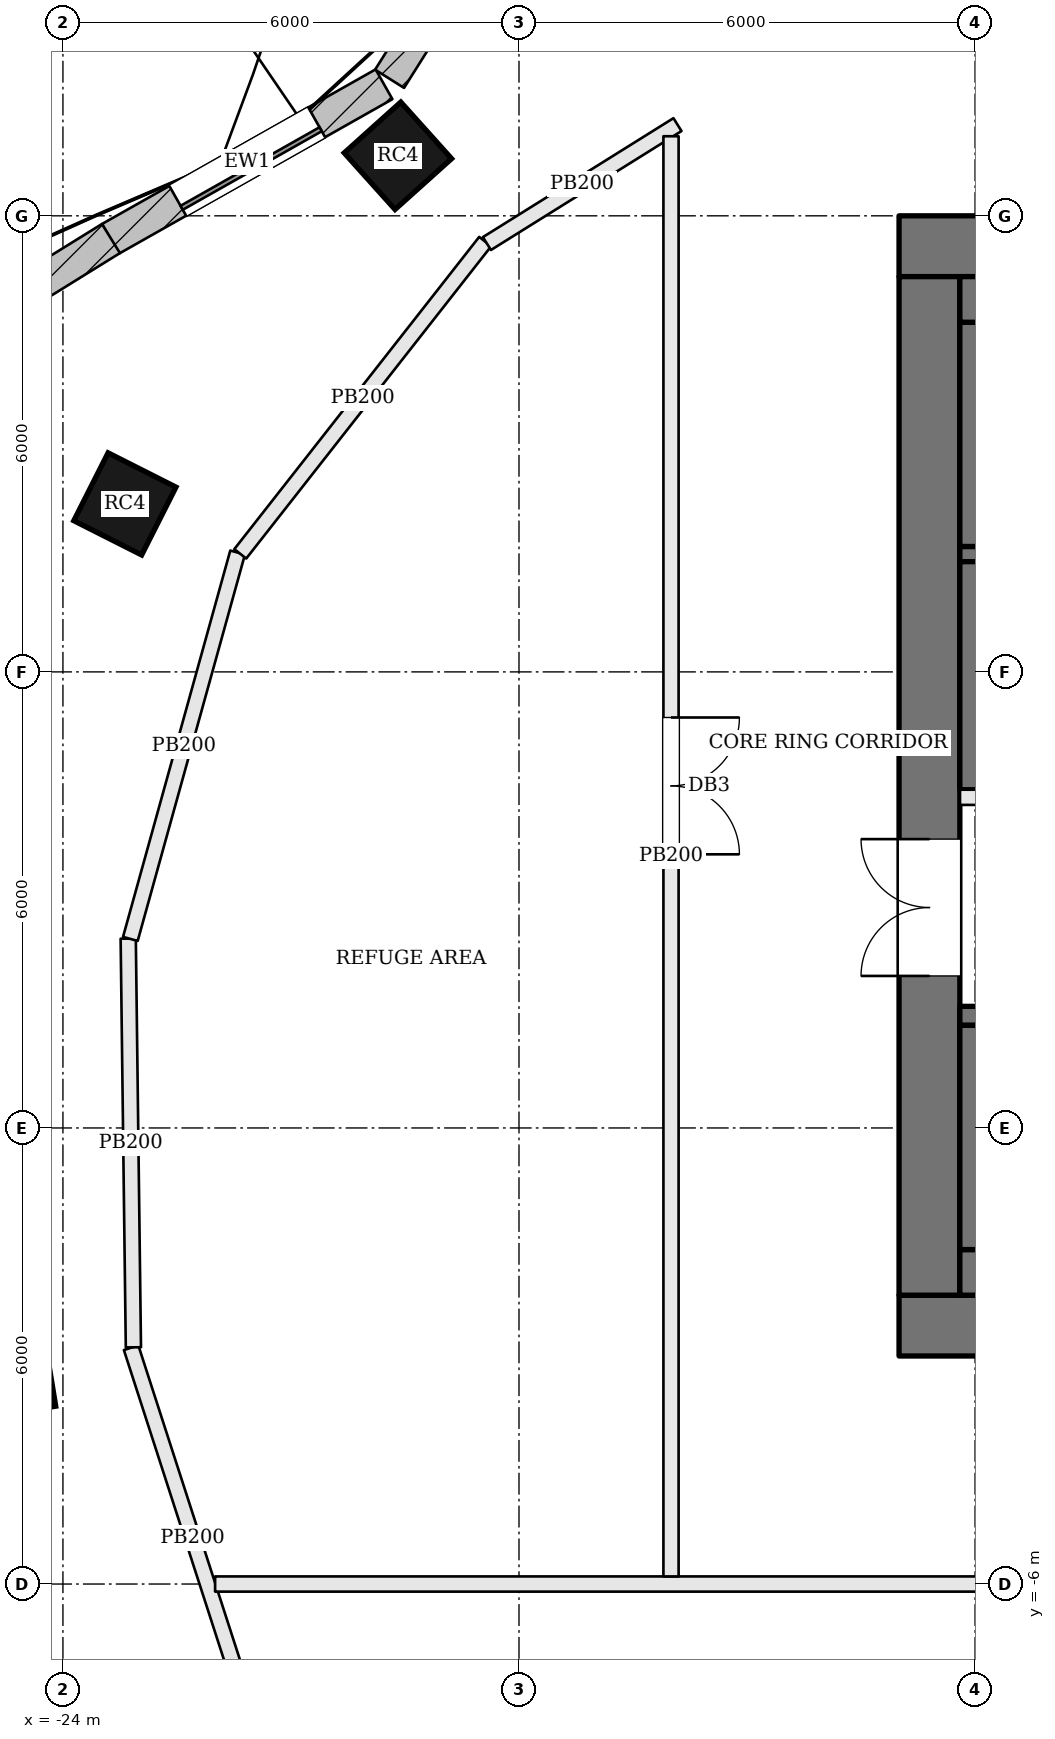
"""IFC4 building model, lengths in metres.
Left out: names, types, materials, properties, quantities, classifications, styles, units other than length and angle.
Written with IfcOpenShell. Run it as: python <this file> out.ifc"""

import sys

from ifc_helpers import new_model, si_unit, direction, frame, frame_2d, origin, origin_2d, place, context, subcontext, project, spatial, rectangle, extrude, element, fill, save


model = new_model("IFC4")
c1 = context("Model", 3, precision=1e-05, world=origin(), true_north=direction((0.0, 1.0)))
c2 = subcontext(c1, "Body", "Model", "MODEL_VIEW")
j1 = project(units=[si_unit("LENGTHUNIT", "METRE"), si_unit("PLANEANGLEUNIT", "RADIAN")], contexts=[c1])
p1 = place(None, origin())
s1 = spatial("IfcSite", under=j1, at=p1, CompositionType="ELEMENT")
p2 = place(p1, origin())
s2 = spatial("IfcBuilding", under=s1, at=p2, CompositionType="ELEMENT")
p3 = place(p2, frame((0.0, 0.0, 193.5)))
s3 = spatial("IfcBuildingStorey", under=s2, at=p3, CompositionType="ELEMENT", Elevation=193.5)
p4 = place(p3, frame((-13.0, 11.6, 0.0), z_axis=(0.0, 0.0, 1.0), x_axis=(1.0, 0.0, 0.0)))
e1 = element("IfcWall", 1, at=p4, inside=s3, PredefinedType="SHEAR", context=c2, shape_type="SweptSolid", body=[
    extrude(rectangle(XDim=26.0, YDim=0.8, at=frame_2d((13.0, 0.0))), origin(), (0.0, 0.0, 1.0), 3.9),
])
p5 = place(p4, frame((8.575, 0.0, 0.0)))
e2 = element("IfcOpeningElement", 2, at=p5, cuts=e1, PredefinedType="OPENING", context=c2, shape_type="SweptSolid", body=[
    extrude(rectangle(XDim=0.7, YDim=2.1, at=frame_2d((0.35, 1.05))), frame((0.0, 0.41, 0.0), z_axis=(0.0, -1.0, 0.0), x_axis=(1.0, 0.0, 0.0)), (0.0, 0.0, 1.0), 0.82),
])
p6 = place(p4, frame((10.875, 0.0, 0.0)))
e3 = element("IfcOpeningElement", 3, at=p6, cuts=e1, PredefinedType="OPENING", context=c2, shape_type="SweptSolid", body=[
    extrude(rectangle(XDim=1.0, YDim=2.1, at=frame_2d((0.5, 1.05))), frame((0.0, 0.41, 0.0), z_axis=(0.0, -1.0, 0.0), x_axis=(1.0, 0.0, 0.0)), (0.0, 0.0, 1.0), 0.82),
])
p7 = place(p4, frame((13.875, 0.0, 0.0)))
e4 = element("IfcOpeningElement", 4, at=p7, cuts=e1, PredefinedType="OPENING", context=c2, shape_type="SweptSolid", body=[
    extrude(rectangle(XDim=0.7, YDim=2.1, at=frame_2d((0.35, 1.05))), frame((0.0, 0.41, 0.0), z_axis=(0.0, -1.0, 0.0), x_axis=(1.0, 0.0, 0.0)), (0.0, 0.0, 1.0), 0.82),
])
p8 = place(p4, frame((16.325, 0.0, 0.0)))
e5 = element("IfcOpeningElement", 5, at=p8, cuts=e1, PredefinedType="OPENING", context=c2, shape_type="SweptSolid", body=[
    extrude(rectangle(XDim=0.7, YDim=2.1, at=frame_2d((0.35, 1.05))), frame((0.0, 0.41, 0.0), z_axis=(0.0, -1.0, 0.0), x_axis=(1.0, 0.0, 0.0)), (0.0, 0.0, 1.0), 0.82),
])
p9 = place(p4, frame((6.88, 0.0, 0.0)))
e6 = element("IfcOpeningElement", 6, at=p9, cuts=e1, PredefinedType="OPENING", context=c2, shape_type="SweptSolid", body=[
    extrude(rectangle(XDim=1.0, YDim=2.1, at=frame_2d((0.5, 1.05))), frame((0.0, 0.41, 0.0), z_axis=(0.0, -1.0, 0.0), x_axis=(1.0, 0.0, 0.0)), (0.0, 0.0, 1.0), 0.82),
])
p10 = place(p4, frame((18.12, 0.0, 0.0)))
e7 = element("IfcOpeningElement", 7, at=p10, cuts=e1, PredefinedType="OPENING", context=c2, shape_type="SweptSolid", body=[
    extrude(rectangle(XDim=1.0, YDim=2.1, at=frame_2d((0.5, 1.05))), frame((0.0, 0.41, 0.0), z_axis=(0.0, -1.0, 0.0), x_axis=(1.0, 0.0, 0.0)), (0.0, 0.0, 1.0), 0.82),
])
p11 = place(p3, frame((-13.0, -2.6, 0.0), z_axis=(0.0, 0.0, 1.0), x_axis=(1.0, 0.0, 0.0)))
e8 = element("IfcWall", 8, at=p11, inside=s3, PredefinedType="SHEAR", context=c2, shape_type="SweptSolid", body=[
    extrude(rectangle(XDim=26.0, YDim=0.8, at=frame_2d((13.0, 0.0))), origin(), (0.0, 0.0, 1.0), 3.9),
])
p12 = place(p11, frame((8.975, 0.0, 0.0)))
e9 = element("IfcOpeningElement", 9, at=p12, cuts=e8, PredefinedType="OPENING", context=c2, shape_type="SweptSolid", body=[
    extrude(rectangle(XDim=0.7, YDim=2.1, at=frame_2d((0.35, 1.05))), frame((0.0, 0.41, 0.0), z_axis=(0.0, -1.0, 0.0), x_axis=(1.0, 0.0, 0.0)), (0.0, 0.0, 1.0), 0.82),
])
p13 = place(p11, frame((11.675, 0.0, 0.0)))
e10 = element("IfcOpeningElement", 10, at=p13, cuts=e8, PredefinedType="OPENING", context=c2, shape_type="SweptSolid", body=[
    extrude(rectangle(XDim=1.0, YDim=2.1, at=frame_2d((0.5, 1.05))), frame((0.0, 0.41, 0.0), z_axis=(0.0, -1.0, 0.0), x_axis=(1.0, 0.0, 0.0)), (0.0, 0.0, 1.0), 0.82),
])
p14 = place(p11, frame((14.275, 0.0, 0.0)))
e11 = element("IfcOpeningElement", 11, at=p14, cuts=e8, PredefinedType="OPENING", context=c2, shape_type="SweptSolid", body=[
    extrude(rectangle(XDim=0.7, YDim=2.1, at=frame_2d((0.35, 1.05))), frame((0.0, 0.41, 0.0), z_axis=(0.0, -1.0, 0.0), x_axis=(1.0, 0.0, 0.0)), (0.0, 0.0, 1.0), 0.82),
])
p15 = place(p11, frame((16.225, 0.0, 0.0)))
e12 = element("IfcOpeningElement", 12, at=p15, cuts=e8, PredefinedType="OPENING", context=c2, shape_type="SweptSolid", body=[
    extrude(rectangle(XDim=0.9, YDim=2.1, at=frame_2d((0.45, 1.05))), frame((0.0, 0.41, 0.0), z_axis=(0.0, -1.0, 0.0), x_axis=(1.0, 0.0, 0.0)), (0.0, 0.0, 1.0), 0.82),
])
p16 = place(p11, frame((6.88, 0.0, 0.0)))
e13 = element("IfcOpeningElement", 13, at=p16, cuts=e8, PredefinedType="OPENING", context=c2, shape_type="SweptSolid", body=[
    extrude(rectangle(XDim=1.0, YDim=2.1, at=frame_2d((0.5, 1.05))), frame((0.0, 0.41, 0.0), z_axis=(0.0, -1.0, 0.0), x_axis=(1.0, 0.0, 0.0)), (0.0, 0.0, 1.0), 0.82),
])
p17 = place(p11, frame((18.12, 0.0, 0.0)))
e14 = element("IfcOpeningElement", 14, at=p17, cuts=e8, PredefinedType="OPENING", context=c2, shape_type="SweptSolid", body=[
    extrude(rectangle(XDim=1.0, YDim=2.1, at=frame_2d((0.5, 1.05))), frame((0.0, 0.41, 0.0), z_axis=(0.0, -1.0, 0.0), x_axis=(1.0, 0.0, 0.0)), (0.0, 0.0, 1.0), 0.82),
])
p18 = place(p3, frame((-12.6, -2.2, 0.0), z_axis=(0.0, 0.0, 1.0), x_axis=(0.0, 1.0, 0.0)))
e15 = element("IfcWall", 15, at=p18, inside=s3, PredefinedType="SHEAR", context=c2, shape_type="SweptSolid", body=[
    extrude(rectangle(XDim=13.4, YDim=0.8, at=frame_2d((6.7, 0.0))), origin(), (0.0, 0.0, 1.0), 3.9),
])
p19 = place(p18, frame((4.2, 0.0, 0.0)))
e16 = element("IfcOpeningElement", 16, at=p19, cuts=e15, PredefinedType="OPENING", context=c2, shape_type="SweptSolid", body=[
    extrude(rectangle(XDim=1.8, YDim=2.1, at=frame_2d((0.9, 1.05))), frame((0.0, 0.41, 0.0), z_axis=(0.0, -1.0, 0.0), x_axis=(1.0, 0.0, 0.0)), (0.0, 0.0, 1.0), 0.82),
])
for number, where, z_axis, x_axis in (
    (17, (-19.593, 12.79, 0.0), (0.0, 0.0, 1.0), (-0.744, -0.668, 0.0)),
    (18, (-23.185, 8.21, 0.0), (0.0, 0.0, 1.0), (-0.451, -0.893, 0.0)),
    (19, (-24.669, -3.248, 0.0), (0.0, 0.0, 1.0), (0.162, -0.987, 0.0)),
):
    element("IfcColumn", number, at=place(p3, frame(where, z_axis=z_axis, x_axis=x_axis)), inside=s3, PredefinedType="COLUMN", context=c2, shape_type="SweptSolid", body=[
        extrude(rectangle(XDim=1.0, YDim=1.0, at=origin_2d()), origin(), (0.0, 0.0, 1.0), 3.9),
    ])
p20 = place(p3, frame((-16.998, 18.099, 0.0), z_axis=(0.0, 0.0, 1.0), x_axis=(-0.532745661304, -0.846275404559, 0.0)))
e20 = element("IfcWall", 20, at=p20, inside=s3, PredefinedType="SOLIDWALL", context=c2, shape_type="SweptSolid", body=[
    extrude(rectangle(XDim=5.076, YDim=0.45, at=frame_2d((2.538, 0.0))), origin(), (0.0, 0.0, 1.0), 3.7),
])
p21 = place(p20, frame((1.638, 0.0, 0.9)))
e21 = element("IfcOpeningElement", 21, at=p21, cuts=e20, PredefinedType="OPENING", context=c2, shape_type="SweptSolid", body=[
    extrude(rectangle(XDim=1.8, YDim=2.3, at=frame_2d((0.9, 1.15))), frame((0.0, 0.235, 0.0), z_axis=(0.0, -1.0, 0.0), x_axis=(1.0, 0.0, 0.0)), (0.0, 0.0, 1.0), 0.47),
])
p22 = place(p3, frame((-19.776, 13.731, 0.0), z_axis=(0.0, 0.0, 1.0), x_axis=(-0.870610133829, -0.491973571318, 0.0)))
e22 = element("IfcWall", 22, at=p22, inside=s3, PredefinedType="SOLIDWALL", context=c2, shape_type="SweptSolid", body=[
    extrude(rectangle(XDim=4.134, YDim=0.45, at=frame_2d((2.067, 0.0))), origin(), (0.0, 0.0, 1.0), 3.7),
])
p23 = place(p22, frame((1.017, 0.0, 0.9)))
e23 = element("IfcOpeningElement", 23, at=p23, cuts=e22, PredefinedType="OPENING", context=c2, shape_type="SweptSolid", body=[
    extrude(rectangle(XDim=2.1, YDim=2.3, at=frame_2d((1.05, 1.15))), frame((0.0, 0.235, 0.0), z_axis=(0.0, -1.0, 0.0), x_axis=(1.0, 0.0, 0.0)), (0.0, 0.0, 1.0), 0.47),
])
p24 = place(p3, frame((-23.368, 11.701, 0.0), z_axis=(0.0, 0.0, 1.0), x_axis=(-0.850251408633, -0.526376806211, 0.0)))
e24 = element("IfcWall", 24, at=p24, inside=s3, PredefinedType="SOLIDWALL", context=c2, shape_type="SweptSolid", body=[
    extrude(rectangle(XDim=5.302, YDim=0.45, at=frame_2d((2.651, 0.0))), origin(), (0.0, 0.0, 1.0), 3.7),
])
p25 = place(p24, frame((1.601, 0.0, 0.9)))
e25 = element("IfcOpeningElement", 25, at=p25, cuts=e24, PredefinedType="OPENING", context=c2, shape_type="SweptSolid", body=[
    extrude(rectangle(XDim=2.1, YDim=2.3, at=frame_2d((1.05, 1.15))), frame((0.0, 0.235, 0.0), z_axis=(0.0, -1.0, 0.0), x_axis=(1.0, 0.0, 0.0)), (0.0, 0.0, 1.0), 0.47),
])
p26 = place(p3, frame((-12.2, 1.475, 0.0), z_axis=(0.0, 0.0, 1.0), x_axis=(1.0, 0.0, 0.0)))
e26 = element("IfcWall", 26, at=p26, inside=s3, PredefinedType="SOLIDWALL", context=c2, shape_type="SweptSolid", body=[
    extrude(rectangle(XDim=7.1, YDim=0.25, at=frame_2d((3.55, 0.0))), origin(), (0.0, 0.0, 1.0), 3.7),
])
p27 = place(p26, frame((5.8, 0.0, 0.0)))
e27 = element("IfcOpeningElement", 27, at=p27, cuts=e26, PredefinedType="OPENING", context=c2, shape_type="SweptSolid", body=[
    extrude(rectangle(XDim=1.2, YDim=2.1, at=frame_2d((0.6, 1.05))), frame((0.0, 0.135, 0.0), z_axis=(0.0, -1.0, 0.0), x_axis=(1.0, 0.0, 0.0)), (0.0, 0.0, 1.0), 0.27),
])
p28 = place(p3, frame((-12.2, 4.35, 0.0), z_axis=(0.0, 0.0, 1.0), x_axis=(1.0, 0.0, 0.0)))
e28 = element("IfcWall", 28, at=p28, inside=s3, PredefinedType="SOLIDWALL", context=c2, shape_type="SweptSolid", body=[
    extrude(rectangle(XDim=7.1, YDim=0.2, at=frame_2d((3.55, 0.0))), origin(), (0.0, 0.0, 1.0), 3.7),
])
p29 = place(p28, frame((4.4, 0.0, 0.0)))
e29 = element("IfcOpeningElement", 29, at=p29, cuts=e28, PredefinedType="OPENING", context=c2, shape_type="SweptSolid", body=[
    extrude(rectangle(XDim=1.2, YDim=2.1, at=frame_2d((0.6, 1.05))), frame((0.0, 0.11, 0.0), z_axis=(0.0, -1.0, 0.0), x_axis=(1.0, 0.0, 0.0)), (0.0, 0.0, 1.0), 0.22),
])
p30 = place(p28, frame((1.1, 0.0, 0.0)))
e30 = element("IfcOpeningElement", 30, at=p30, cuts=e28, PredefinedType="OPENING", context=c2, shape_type="SweptSolid", body=[
    extrude(rectangle(XDim=1.2, YDim=2.1, at=frame_2d((0.6, 1.05))), frame((0.0, 0.11, 0.0), z_axis=(0.0, -1.0, 0.0), x_axis=(1.0, 0.0, 0.0)), (0.0, 0.0, 1.0), 0.22),
])
p31 = place(p3, frame((-12.2, 7.525, 0.0), z_axis=(0.0, 0.0, 1.0), x_axis=(1.0, 0.0, 0.0)))
e31 = element("IfcWall", 31, at=p31, inside=s3, PredefinedType="SOLIDWALL", context=c2, shape_type="SweptSolid", body=[
    extrude(rectangle(XDim=7.1, YDim=0.25, at=frame_2d((3.55, 0.0))), origin(), (0.0, 0.0, 1.0), 3.7),
])
p32 = place(p31, frame((5.8, 0.0, 0.0)))
e32 = element("IfcOpeningElement", 32, at=p32, cuts=e31, PredefinedType="OPENING", context=c2, shape_type="SweptSolid", body=[
    extrude(rectangle(XDim=1.2, YDim=2.1, at=frame_2d((0.6, 1.05))), frame((0.0, 0.135, 0.0), z_axis=(0.0, -1.0, 0.0), x_axis=(1.0, 0.0, 0.0)), (0.0, 0.0, 1.0), 0.27),
])
p33 = place(p3, frame((-12.2, -1.9, 0.0), z_axis=(0.0, 0.0, 1.0), x_axis=(1.0, 0.0, 0.0)))
e33 = element("IfcWall", 33, at=p33, inside=s3, PredefinedType="SOLIDWALL", context=c2, shape_type="SweptSolid", body=[
    extrude(rectangle(XDim=6.08, YDim=0.6, at=frame_2d((3.04, 0.0))), origin(), (0.0, 0.0, 1.0), 3.7),
])
p34 = place(p3, frame((-11.9, -1.6, 0.0), z_axis=(0.0, 0.0, 1.0), x_axis=(0.0, 1.0, 0.0)))
e34 = element("IfcWall", 34, at=p34, inside=s3, PredefinedType="SOLIDWALL", context=c2, shape_type="SweptSolid", body=[
    extrude(rectangle(XDim=2.95, YDim=0.6, at=frame_2d((1.475, 0.0))), origin(), (0.0, 0.0, 1.0), 3.7),
])
p35 = place(p3, frame((-11.9, 4.45, 0.0), z_axis=(0.0, 0.0, 1.0), x_axis=(0.0, 1.0, 0.0)))
e35 = element("IfcWall", 35, at=p35, inside=s3, PredefinedType="SOLIDWALL", context=c2, shape_type="SweptSolid", body=[
    extrude(rectangle(XDim=3.0, YDim=0.6, at=frame_2d((1.5, 0.0))), origin(), (0.0, 0.0, 1.0), 3.7),
])
p36 = place(p3, frame((-11.9, 7.65, 0.0), z_axis=(0.0, 0.0, 1.0), x_axis=(0.0, 1.0, 0.0)))
e36 = element("IfcWall", 36, at=p36, inside=s3, PredefinedType="SOLIDWALL", context=c2, shape_type="SweptSolid", body=[
    extrude(rectangle(XDim=2.95, YDim=0.6, at=frame_2d((1.475, 0.0))), origin(), (0.0, 0.0, 1.0), 3.7),
])
p37 = place(p3, frame((-12.2, 10.9, 0.0), z_axis=(0.0, 0.0, 1.0), x_axis=(1.0, 0.0, 0.0)))
e37 = element("IfcWall", 37, at=p37, inside=s3, PredefinedType="SOLIDWALL", context=c2, shape_type="SweptSolid", body=[
    extrude(rectangle(XDim=6.08, YDim=0.6, at=frame_2d((3.04, 0.0))), origin(), (0.0, 0.0, 1.0), 3.7),
])
p38 = place(p3, frame((-21.486, -7.895, 0.0), z_axis=(0.0, 0.0, 1.0), x_axis=(-0.307481575482, 0.951554034587, 0.0)))
e38 = element("IfcWall", 38, at=p38, inside=s3, PredefinedType="PARTITIONING", context=c2, shape_type="SweptSolid", body=[
    extrude(rectangle(XDim=5.259, YDim=0.2, at=frame_2d((2.629, 0.0))), origin(), (0.0, 0.0, 1.0), 3.7),
])
p39 = place(p3, frame((-21.998, -6.0, 0.0), z_axis=(0.0, 0.0, 1.0), x_axis=(1.0, 0.0, 0.0)))
e39 = element("IfcWall", 39, at=p39, inside=s3, PredefinedType="PARTITIONING", context=c2, shape_type="SweptSolid", body=[
    extrude(rectangle(XDim=44.036, YDim=0.2, at=frame_2d((22.018, 0.0))), origin(), (0.0, 0.0, 1.0), 3.7),
])
p40 = place(p39, frame((21.098, 0.0, 0.0)))
e40 = element("IfcOpeningElement", 40, at=p40, cuts=e39, PredefinedType="OPENING", context=c2, shape_type="SweptSolid", body=[
    extrude(rectangle(XDim=1.8, YDim=2.1, at=frame_2d((0.9, 1.05))), frame((0.0, 0.11, 0.0), z_axis=(0.0, -1.0, 0.0), x_axis=(1.0, 0.0, 0.0)), (0.0, 0.0, 1.0), 0.22),
])
p41 = place(p3, frame((-23.073, -2.886, 0.0), z_axis=(0.0, 0.0, 1.0), x_axis=(-0.012666982201, 0.999919770563, 0.0)))
e41 = element("IfcWall", 41, at=p41, inside=s3, PredefinedType="PARTITIONING", context=c2, shape_type="SweptSolid", body=[
    extrude(rectangle(XDim=5.377, YDim=0.2, at=frame_2d((2.689, 0.0))), origin(), (0.0, 0.0, 1.0), 3.7),
])
p42 = place(p3, frame((-23.113, 2.487, 0.0), z_axis=(0.0, 0.0, 1.0), x_axis=(0.267500643582, 0.963557681555, 0.0)))
e42 = element("IfcWall", 42, at=p42, inside=s3, PredefinedType="PARTITIONING", context=c2, shape_type="SweptSolid", body=[
    extrude(rectangle(XDim=5.275, YDim=0.2, at=frame_2d((2.638, 0.0))), origin(), (0.0, 0.0, 1.0), 3.7),
])
p43 = place(p3, frame((-21.667, 7.553, 0.0), z_axis=(0.0, 0.0, 1.0), x_axis=(0.617143909163, 0.786850300491, 0.0)))
e43 = element("IfcWall", 43, at=p43, inside=s3, PredefinedType="PARTITIONING", context=c2, shape_type="SweptSolid", body=[
    extrude(rectangle(XDim=5.221, YDim=0.2, at=frame_2d((2.61, 0.0))), origin(), (0.0, 0.0, 1.0), 3.7),
])
p44 = place(p3, frame((-18.422, 11.635, 0.0), z_axis=(0.0, 0.0, 1.0), x_axis=(0.848299824463, 0.529516201656, 0.0)))
e44 = element("IfcWall", 44, at=p44, inside=s3, PredefinedType="PARTITIONING", context=c2, shape_type="SweptSolid", body=[
    extrude(rectangle(XDim=2.955, YDim=0.2, at=frame_2d((1.478, 0.0))), origin(), (0.0, 0.0, 1.0), 3.7),
])
p45 = place(p3, frame((-16.0, 13.047, 0.0), z_axis=(0.0, 0.0, 1.0), x_axis=(0.0, -1.0, 0.0)))
e45 = element("IfcWall", 45, at=p45, inside=s3, PredefinedType="PARTITIONING", context=c2, shape_type="SweptSolid", body=[
    extrude(rectangle(XDim=18.947, YDim=0.2, at=frame_2d((9.474, 0.0))), origin(), (0.0, 0.0, 1.0), 3.7),
])
p46 = place(p45, frame((7.647, 0.0, 0.0)))
e46 = element("IfcOpeningElement", 46, at=p46, cuts=e45, PredefinedType="OPENING", context=c2, shape_type="SweptSolid", body=[
    extrude(rectangle(XDim=1.8, YDim=2.1, at=frame_2d((0.9, 1.05))), frame((0.0, 0.11, 0.0), z_axis=(0.0, -1.0, 0.0), x_axis=(1.0, 0.0, 0.0)), (0.0, 0.0, 1.0), 0.22),
])
p47 = place(p23, origin())
e47 = element("IfcWindow", 47, at=p47, inside=s3, PartitioningType="SINGLE_PANEL", PredefinedType="WINDOW", context=c2, shape_type="SweptSolid", body=[
    extrude(rectangle(XDim=2.1, YDim=2.3, at=frame_2d((1.05, 1.15))), frame((0.0, 0.135, 0.0), z_axis=(0.0, -1.0, 0.0), x_axis=(1.0, 0.0, 0.0)), (0.0, 0.0, 1.0), 0.06),
])
fill(e23, e47)
p48 = place(p19, origin())
e48 = element("IfcDoor", 48, at=p48, inside=s3, OperationType="DOUBLE_DOOR_SINGLE_SWING", PredefinedType="DOOR", context=c2, shape_type="SweptSolid", body=[
    extrude(rectangle(XDim=1.8, YDim=2.1, at=frame_2d((0.9, 1.05))), frame((0.0, 0.025, 0.0), z_axis=(0.0, -1.0, 0.0), x_axis=(1.0, 0.0, 0.0)), (0.0, 0.0, 1.0), 0.05),
])
fill(e16, e48)
p49 = place(p46, origin())
e49 = element("IfcDoor", 49, at=p49, inside=s3, OperationType="DOUBLE_DOOR_SINGLE_SWING", PredefinedType="DOOR", context=c2, shape_type="SweptSolid", body=[
    extrude(rectangle(XDim=1.8, YDim=2.1, at=frame_2d((0.9, 1.05))), frame((0.0, 0.025, 0.0), z_axis=(0.0, -1.0, 0.0), x_axis=(1.0, 0.0, 0.0)), (0.0, 0.0, 1.0), 0.05),
])
fill(e46, e49)
save(model, sys.argv[1])
